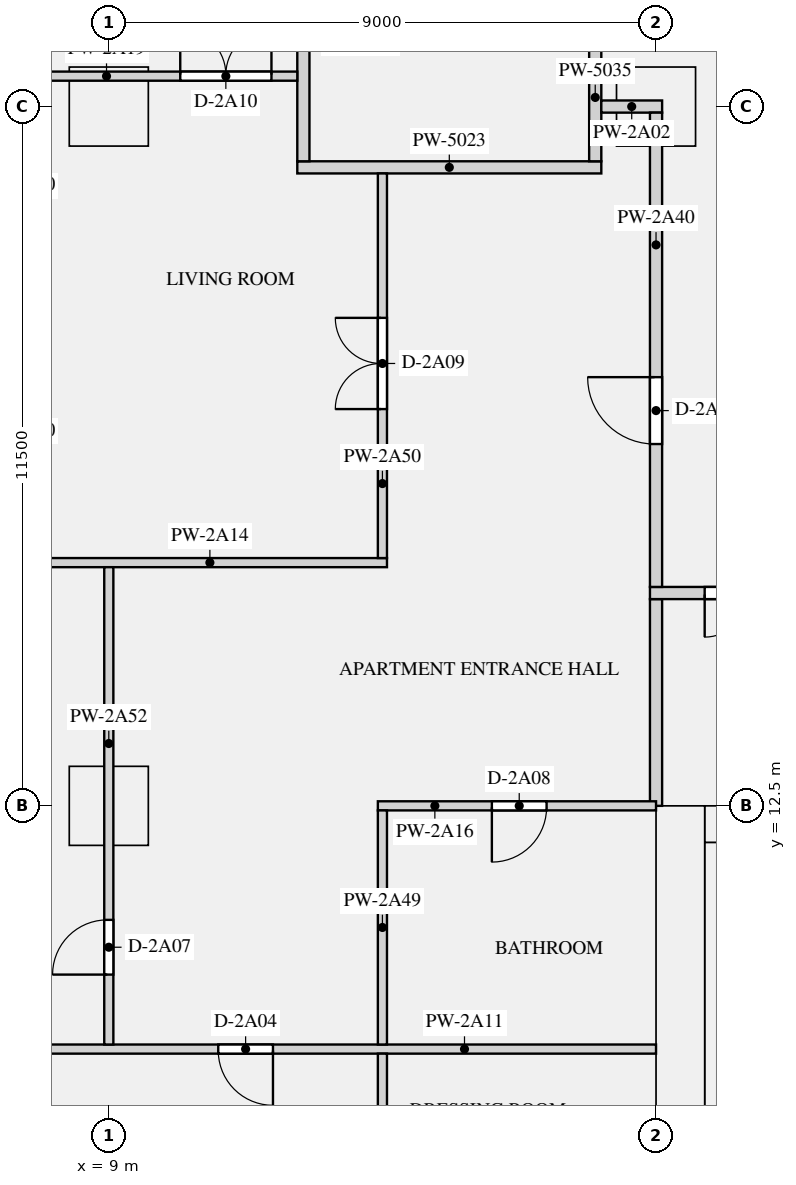
"""IFC4 building model, lengths in metres.
Left out: names, types, materials, properties, quantities, classifications, styles, units other than length and angle.
Written with IfcOpenShell. Run it as: python <this file> out.ifc"""

import sys

from ifc_helpers import new_model, si_unit, direction, frame, frame_2d, origin, origin_2d, place, context, subcontext, project, spatial, rectangle, extrude, element, fill, save


model = new_model("IFC4")
c1 = context("Model", 3, precision=1e-05, world=origin(), true_north=direction((0.0, 1.0)))
c2 = subcontext(c1, "Body", "Model", "MODEL_VIEW")
j1 = project(units=[si_unit("LENGTHUNIT", "METRE"), si_unit("PLANEANGLEUNIT", "RADIAN")], contexts=[c1])
p1 = place(None, origin())
s1 = spatial("IfcSite", under=j1, at=p1, CompositionType="ELEMENT")
p2 = place(p1, origin())
s2 = spatial("IfcBuilding", under=s1, at=p2, CompositionType="ELEMENT")
p3 = place(p2, frame((0.0, 0.0, 83.55)))
s3 = spatial("IfcBuildingStorey", under=s2, at=p3, CompositionType="ELEMENT", Elevation=83.55)
for number, where, z_axis, x_axis in (
    (1, (9.0, 24.0, 0.0), (0.0, 0.0, 1.0), (1.0, 0.0, 0.0)),
    (2, (18.0, 24.0, 0.0), (0.0, 0.0, 1.0), (1.0, 0.0, 0.0)),
    (3, (9.0, 12.5, 0.0), (0.0, 0.0, 1.0), (1.0, 0.0, 0.0)),
):
    element("IfcColumn", number, at=place(p3, frame(where, z_axis=z_axis, x_axis=x_axis)), inside=s3, PredefinedType="COLUMN", context=c2, shape_type="SweptSolid", body=[
        extrude(rectangle(XDim=1.3, YDim=1.3, at=origin_2d()), origin(), (0.0, 0.0, 1.0), 3.15),
    ])
p4 = place(p3, frame((18.4, 0.0, 0.0), z_axis=(0.0, 0.0, 1.0), x_axis=(0.0, 1.0, 0.0)))
e4 = element("IfcWall", 4, at=p4, inside=s3, PredefinedType="SHEAR", context=c2, shape_type="SweptSolid", body=[
    extrude(rectangle(XDim=12.5, YDim=0.8, at=frame_2d((6.25, 0.0))), origin(), (0.0, 0.0, 1.0), 3.15),
])
p5 = place(p3, frame((18.8, 12.2, 0.0), z_axis=(0.0, 0.0, 1.0), x_axis=(1.0, 0.0, 0.0)))
e5 = element("IfcWall", 5, at=p5, inside=s3, PredefinedType="SHEAR", context=c2, shape_type="SweptSolid", body=[
    extrude(rectangle(XDim=34.4, YDim=0.6, at=frame_2d((17.2, 0.0))), origin(), (0.0, 0.0, 1.0), 3.15),
])
p6 = place(p5, frame((24.375, 0.0, 0.0)))
e6 = element("IfcOpeningElement", 6, at=p6, cuts=e5, PredefinedType="OPENING", context=c2, shape_type="SweptSolid", body=[
    extrude(rectangle(XDim=1.1, YDim=2.1, at=frame_2d((0.55, 1.05))), frame((0.0, 0.31, 0.0), z_axis=(0.0, -1.0, 0.0), x_axis=(1.0, 0.0, 0.0)), (0.0, 0.0, 1.0), 0.62),
])
p7 = place(p5, frame((26.625, 0.0, 0.0)))
e7 = element("IfcOpeningElement", 7, at=p7, cuts=e5, PredefinedType="OPENING", context=c2, shape_type="SweptSolid", body=[
    extrude(rectangle(XDim=1.1, YDim=2.1, at=frame_2d((0.55, 1.05))), frame((0.0, 0.31, 0.0), z_axis=(0.0, -1.0, 0.0), x_axis=(1.0, 0.0, 0.0)), (0.0, 0.0, 1.0), 0.62),
])
p8 = place(p5, frame((28.875, 0.0, 0.0)))
e8 = element("IfcOpeningElement", 8, at=p8, cuts=e5, PredefinedType="OPENING", context=c2, shape_type="SweptSolid", body=[
    extrude(rectangle(XDim=1.1, YDim=2.1, at=frame_2d((0.55, 1.05))), frame((0.0, 0.31, 0.0), z_axis=(0.0, -1.0, 0.0), x_axis=(1.0, 0.0, 0.0)), (0.0, 0.0, 1.0), 0.62),
])
p9 = place(p5, frame((14.25, 0.0, 0.0)))
e9 = element("IfcOpeningElement", 9, at=p9, cuts=e5, PredefinedType="OPENING", context=c2, shape_type="SweptSolid", body=[
    extrude(rectangle(XDim=0.9, YDim=2.1, at=frame_2d((0.45, 1.05))), frame((0.0, 0.31, 0.0), z_axis=(0.0, -1.0, 0.0), x_axis=(1.0, 0.0, 0.0)), (0.0, 0.0, 1.0), 0.62),
])
p10 = place(p5, frame((1.35, 0.0, 0.0)))
e10 = element("IfcOpeningElement", 10, at=p10, cuts=e5, PredefinedType="OPENING", context=c2, shape_type="SweptSolid", body=[
    extrude(rectangle(XDim=1.2, YDim=2.1, at=frame_2d((0.6, 1.05))), frame((0.0, 0.31, 0.0), z_axis=(0.0, -1.0, 0.0), x_axis=(1.0, 0.0, 0.0)), (0.0, 0.0, 1.0), 0.62),
])
p11 = place(p5, frame((31.85, 0.0, 0.0)))
e11 = element("IfcOpeningElement", 11, at=p11, cuts=e5, PredefinedType="OPENING", context=c2, shape_type="SweptSolid", body=[
    extrude(rectangle(XDim=1.2, YDim=2.1, at=frame_2d((0.6, 1.05))), frame((0.0, 0.31, 0.0), z_axis=(0.0, -1.0, 0.0), x_axis=(1.0, 0.0, 0.0)), (0.0, 0.0, 1.0), 0.62),
])
p12 = place(p3, frame((18.9, 1.0, 0.0), z_axis=(0.0, 0.0, 1.0), x_axis=(0.0, 1.0, 0.0)))
e12 = element("IfcWall", 12, at=p12, inside=s3, PredefinedType="SHEAR", context=c2, shape_type="SweptSolid", body=[
    extrude(rectangle(XDim=10.9, YDim=0.2, at=frame_2d((5.45, 0.0))), origin(), (0.0, 0.0, 1.0), 3.15),
])
p13 = place(p3, frame((12.1, 23.0, 0.0), z_axis=(0.0, 0.0, 1.0), x_axis=(1.0, 0.0, 0.0)))
e13 = element("IfcWall", 13, at=p13, inside=s3, PredefinedType="PARTITIONING", context=c2, shape_type="SweptSolid", body=[
    extrude(rectangle(XDim=5.0, YDim=0.2, at=frame_2d((2.5, 0.0))), origin(), (0.0, 0.0, 1.0), 2.83),
])
p14 = place(p3, frame((18.0, 12.5, 0.0), z_axis=(0.0, 0.0, 1.0), x_axis=(0.0, 1.0, 0.0)))
e14 = element("IfcWall", 14, at=p14, inside=s3, PredefinedType="PARTITIONING", context=c2, shape_type="SweptSolid", body=[
    extrude(rectangle(XDim=3.4, YDim=0.2, at=frame_2d((1.7, 0.0))), origin(), (0.0, 0.0, 1.0), 2.83),
])
p15 = place(p3, frame((12.2, 23.1, 0.0), z_axis=(0.0, 0.0, 1.0), x_axis=(0.0, 1.0, 0.0)))
e15 = element("IfcWall", 15, at=p15, inside=s3, PredefinedType="PARTITIONING", context=c2, shape_type="SweptSolid", body=[
    extrude(rectangle(XDim=3.9, YDim=0.2, at=frame_2d((1.95, 0.0))), origin(), (0.0, 0.0, 1.0), 2.83),
])
p16 = place(p3, frame((17.0, 23.1, 0.0), z_axis=(0.0, 0.0, 1.0), x_axis=(0.0, 1.0, 0.0)))
e16 = element("IfcWall", 16, at=p16, inside=s3, PredefinedType="PARTITIONING", context=c2, shape_type="SweptSolid", body=[
    extrude(rectangle(XDim=3.8, YDim=0.2, at=frame_2d((1.9, 0.0))), origin(), (0.0, 0.0, 1.0), 2.83),
])
p17 = place(p16, frame((2.1, 0.0, 0.0)))
e17 = element("IfcOpeningElement", 17, at=p17, cuts=e16, PredefinedType="OPENING", context=c2, shape_type="SweptSolid", body=[
    extrude(rectangle(XDim=1.2, YDim=2.1, at=frame_2d((0.6, 1.05))), frame((0.0, 0.11, 0.0), z_axis=(0.0, -1.0, 0.0), x_axis=(1.0, 0.0, 0.0)), (0.0, 0.0, 1.0), 0.22),
])
p18 = place(p3, frame((17.1, 24.0, 0.0), z_axis=(0.0, 0.0, 1.0), x_axis=(1.0, 0.0, 0.0)))
e18 = element("IfcWall", 18, at=p18, inside=s3, PredefinedType="PARTITIONING", context=c2, shape_type="SweptSolid", body=[
    extrude(rectangle(XDim=1.0, YDim=0.2, at=frame_2d((0.5, 0.0))), origin(), (0.0, 0.0, 1.0), 2.83),
])
p19 = place(p3, frame((5.25, 8.5, 0.0), z_axis=(0.0, 0.0, 1.0), x_axis=(1.0, 0.0, 0.0)))
e19 = element("IfcWall", 19, at=p19, inside=s3, PredefinedType="PARTITIONING", context=c2, shape_type="SweptSolid", body=[
    extrude(rectangle(XDim=12.75, YDim=0.15, at=frame_2d((6.375, 0.0))), origin(), (0.0, 0.0, 1.0), 2.83),
])
p20 = place(p19, frame((5.55, 0.0, 0.0)))
e20 = element("IfcOpeningElement", 20, at=p20, cuts=e19, PredefinedType="OPENING", context=c2, shape_type="SweptSolid", body=[
    extrude(rectangle(XDim=0.9, YDim=2.1, at=frame_2d((0.45, 1.05))), frame((0.0, 0.085, 0.0), z_axis=(0.0, -1.0, 0.0), x_axis=(1.0, 0.0, 0.0)), (0.0, 0.0, 1.0), 0.17),
])
p21 = place(p3, frame((7.75, 16.5, 0.0), z_axis=(0.0, 0.0, 1.0), x_axis=(1.0, 0.0, 0.0)))
e21 = element("IfcWall", 21, at=p21, inside=s3, PredefinedType="PARTITIONING", context=c2, shape_type="SweptSolid", body=[
    extrude(rectangle(XDim=5.825, YDim=0.15, at=frame_2d((2.913, 0.0))), origin(), (0.0, 0.0, 1.0), 2.83),
])
p22 = place(p3, frame((13.425, 12.5, 0.0), z_axis=(0.0, 0.0, 1.0), x_axis=(1.0, 0.0, 0.0)))
e22 = element("IfcWall", 22, at=p22, inside=s3, PredefinedType="PARTITIONING", context=c2, shape_type="SweptSolid", body=[
    extrude(rectangle(XDim=4.575, YDim=0.15, at=frame_2d((2.288, 0.0))), origin(), (0.0, 0.0, 1.0), 2.83),
])
p23 = place(p22, frame((1.875, 0.0, 0.0)))
e23 = element("IfcOpeningElement", 23, at=p23, cuts=e22, PredefinedType="OPENING", context=c2, shape_type="SweptSolid", body=[
    extrude(rectangle(XDim=0.9, YDim=2.1, at=frame_2d((0.45, 1.05))), frame((0.0, 0.085, 0.0), z_axis=(0.0, -1.0, 0.0), x_axis=(1.0, 0.0, 0.0)), (0.0, 0.0, 1.0), 0.17),
])
p24 = place(p3, frame((7.75, 24.5, 0.0), z_axis=(0.0, 0.0, 1.0), x_axis=(1.0, 0.0, 0.0)))
e24 = element("IfcWall", 24, at=p24, inside=s3, PredefinedType="PARTITIONING", context=c2, shape_type="SweptSolid", body=[
    extrude(rectangle(XDim=4.35, YDim=0.15, at=frame_2d((2.175, 0.0))), origin(), (0.0, 0.0, 1.0), 2.83),
])
p25 = place(p24, frame((2.425, 0.0, 0.0)))
e25 = element("IfcOpeningElement", 25, at=p25, cuts=e24, PredefinedType="OPENING", context=c2, shape_type="SweptSolid", body=[
    extrude(rectangle(XDim=1.5, YDim=2.1, at=frame_2d((0.75, 1.05))), frame((0.0, 0.085, 0.0), z_axis=(0.0, -1.0, 0.0), x_axis=(1.0, 0.0, 0.0)), (0.0, 0.0, 1.0), 0.17),
])
p26 = place(p3, frame((17.9, 16.0, 0.0), z_axis=(0.0, 0.0, 1.0), x_axis=(1.0, 0.0, 0.0)))
e26 = element("IfcWall", 26, at=p26, inside=s3, PredefinedType="PARTITIONING", context=c2, shape_type="SweptSolid", body=[
    extrude(rectangle(XDim=36.2, YDim=0.2, at=frame_2d((18.1, 0.0))), origin(), (0.0, 0.0, 1.0), 2.83),
])
p27 = place(p26, frame((0.9, 0.0, 0.0)))
e27 = element("IfcOpeningElement", 27, at=p27, cuts=e26, PredefinedType="OPENING", context=c2, shape_type="SweptSolid", body=[
    extrude(rectangle(XDim=1.4, YDim=2.1, at=frame_2d((0.7, 1.05))), frame((0.0, 0.11, 0.0), z_axis=(0.0, -1.0, 0.0), x_axis=(1.0, 0.0, 0.0)), (0.0, 0.0, 1.0), 0.22),
])
p28 = place(p26, frame((33.9, 0.0, 0.0)))
e28 = element("IfcOpeningElement", 28, at=p28, cuts=e26, PredefinedType="OPENING", context=c2, shape_type="SweptSolid", body=[
    extrude(rectangle(XDim=1.4, YDim=2.1, at=frame_2d((0.7, 1.05))), frame((0.0, 0.11, 0.0), z_axis=(0.0, -1.0, 0.0), x_axis=(1.0, 0.0, 0.0)), (0.0, 0.0, 1.0), 0.22),
])
p29 = place(p3, frame((18.0, 16.1, 0.0), z_axis=(0.0, 0.0, 1.0), x_axis=(0.0, 1.0, 0.0)))
e29 = element("IfcWall", 29, at=p29, inside=s3, PredefinedType="PARTITIONING", context=c2, shape_type="SweptSolid", body=[
    extrude(rectangle(XDim=7.8, YDim=0.2, at=frame_2d((3.9, 0.0))), origin(), (0.0, 0.0, 1.0), 2.83),
])
p30 = place(p29, frame((2.35, 0.0, 0.0)))
e30 = element("IfcOpeningElement", 30, at=p30, cuts=e29, PredefinedType="OPENING", context=c2, shape_type="SweptSolid", body=[
    extrude(rectangle(XDim=1.1, YDim=2.1, at=frame_2d((0.55, 1.05))), frame((0.0, 0.11, 0.0), z_axis=(0.0, -1.0, 0.0), x_axis=(1.0, 0.0, 0.0)), (0.0, 0.0, 1.0), 0.22),
])
p31 = place(p3, frame((13.5, 0.75, 0.0), z_axis=(0.0, 0.0, 1.0), x_axis=(0.0, 1.0, 0.0)))
e31 = element("IfcWall", 31, at=p31, inside=s3, PredefinedType="PARTITIONING", context=c2, shape_type="SweptSolid", body=[
    extrude(rectangle(XDim=7.675, YDim=0.15, at=frame_2d((3.837, 0.0))), origin(), (0.0, 0.0, 1.0), 2.83),
])
p32 = place(p31, frame((1.25, 0.0, 0.0)))
e32 = element("IfcOpeningElement", 32, at=p32, cuts=e31, PredefinedType="OPENING", context=c2, shape_type="SweptSolid", body=[
    extrude(rectangle(XDim=0.9, YDim=2.1, at=frame_2d((0.45, 1.05))), frame((0.0, 0.085, 0.0), z_axis=(0.0, -1.0, 0.0), x_axis=(1.0, 0.0, 0.0)), (0.0, 0.0, 1.0), 0.17),
])
p33 = place(p31, frame((5.2, 0.0, 0.0)))
e33 = element("IfcOpeningElement", 33, at=p33, cuts=e31, PredefinedType="OPENING", context=c2, shape_type="SweptSolid", body=[
    extrude(rectangle(XDim=0.9, YDim=2.1, at=frame_2d((0.45, 1.05))), frame((0.0, 0.085, 0.0), z_axis=(0.0, -1.0, 0.0), x_axis=(1.0, 0.0, 0.0)), (0.0, 0.0, 1.0), 0.17),
])
p34 = place(p3, frame((13.5, 8.575, 0.0), z_axis=(0.0, 0.0, 1.0), x_axis=(0.0, 1.0, 0.0)))
e34 = element("IfcWall", 34, at=p34, inside=s3, PredefinedType="PARTITIONING", context=c2, shape_type="SweptSolid", body=[
    extrude(rectangle(XDim=3.85, YDim=0.15, at=frame_2d((1.925, 0.0))), origin(), (0.0, 0.0, 1.0), 2.83),
])
p35 = place(p3, frame((13.5, 16.575, 0.0), z_axis=(0.0, 0.0, 1.0), x_axis=(0.0, 1.0, 0.0)))
e35 = element("IfcWall", 35, at=p35, inside=s3, PredefinedType="PARTITIONING", context=c2, shape_type="SweptSolid", body=[
    extrude(rectangle(XDim=6.325, YDim=0.15, at=frame_2d((3.163, 0.0))), origin(), (0.0, 0.0, 1.0), 2.83),
])
p36 = place(p35, frame((2.45, 0.0, 0.0)))
e36 = element("IfcOpeningElement", 36, at=p36, cuts=e35, PredefinedType="OPENING", context=c2, shape_type="SweptSolid", body=[
    extrude(rectangle(XDim=1.5, YDim=2.1, at=frame_2d((0.75, 1.05))), frame((0.0, 0.085, 0.0), z_axis=(0.0, -1.0, 0.0), x_axis=(1.0, 0.0, 0.0)), (0.0, 0.0, 1.0), 0.17),
])
p37 = place(p3, frame((9.0, 8.575, 0.0), z_axis=(0.0, 0.0, 1.0), x_axis=(0.0, 1.0, 0.0)))
e37 = element("IfcWall", 37, at=p37, inside=s3, PredefinedType="PARTITIONING", context=c2, shape_type="SweptSolid", body=[
    extrude(rectangle(XDim=7.85, YDim=0.15, at=frame_2d((3.925, 0.0))), origin(), (0.0, 0.0, 1.0), 2.83),
])
p38 = place(p37, frame((1.15, 0.0, 0.0)))
e38 = element("IfcOpeningElement", 38, at=p38, cuts=e37, PredefinedType="OPENING", context=c2, shape_type="SweptSolid", body=[
    extrude(rectangle(XDim=0.9, YDim=2.1, at=frame_2d((0.45, 1.05))), frame((0.0, 0.085, 0.0), z_axis=(0.0, -1.0, 0.0), x_axis=(1.0, 0.0, 0.0)), (0.0, 0.0, 1.0), 0.17),
])
p39 = place(p27, frame((1.4, 0.0, 0.0), z_axis=(0.0, 0.0, 1.0), x_axis=(-1.0, 0.0, 0.0)))
e39 = element("IfcDoor", 39, at=p39, inside=s3, OperationType="DOUBLE_DOOR_SINGLE_SWING", PredefinedType="DOOR", context=c2, shape_type="SweptSolid", body=[
    extrude(rectangle(XDim=1.4, YDim=2.1, at=frame_2d((0.7, 1.05))), frame((0.0, 0.025, 0.0), z_axis=(0.0, -1.0, 0.0), x_axis=(1.0, 0.0, 0.0)), (0.0, 0.0, 1.0), 0.05),
])
fill(e27, e39)
p40 = place(p30, origin())
e40 = element("IfcDoor", 40, at=p40, inside=s3, OperationType="SINGLE_SWING_RIGHT", PredefinedType="DOOR", context=c2, shape_type="SweptSolid", body=[
    extrude(rectangle(XDim=1.1, YDim=2.1, at=frame_2d((0.55, 1.05))), frame((0.0, 0.025, 0.0), z_axis=(0.0, -1.0, 0.0), x_axis=(1.0, 0.0, 0.0)), (0.0, 0.0, 1.0), 0.05),
])
fill(e30, e40)
p41 = place(p20, frame((0.9, 0.0, 0.0), z_axis=(0.0, 0.0, 1.0), x_axis=(-1.0, 0.0, 0.0)))
e41 = element("IfcDoor", 41, at=p41, inside=s3, OperationType="SINGLE_SWING_LEFT", PredefinedType="DOOR", context=c2, shape_type="SweptSolid", body=[
    extrude(rectangle(XDim=0.9, YDim=2.1, at=frame_2d((0.45, 1.05))), frame((0.0, 0.025, 0.0), z_axis=(0.0, -1.0, 0.0), x_axis=(1.0, 0.0, 0.0)), (0.0, 0.0, 1.0), 0.05),
])
fill(e20, e41)
p42 = place(p38, origin())
e42 = element("IfcDoor", 42, at=p42, inside=s3, OperationType="SINGLE_SWING_LEFT", PredefinedType="DOOR", context=c2, shape_type="SweptSolid", body=[
    extrude(rectangle(XDim=0.9, YDim=2.1, at=frame_2d((0.45, 1.05))), frame((0.0, 0.025, 0.0), z_axis=(0.0, -1.0, 0.0), x_axis=(1.0, 0.0, 0.0)), (0.0, 0.0, 1.0), 0.05),
])
fill(e38, e42)
p43 = place(p23, frame((0.9, 0.0, 0.0), z_axis=(0.0, 0.0, 1.0), x_axis=(-1.0, 0.0, 0.0)))
e43 = element("IfcDoor", 43, at=p43, inside=s3, OperationType="SINGLE_SWING_RIGHT", PredefinedType="DOOR", context=c2, shape_type="SweptSolid", body=[
    extrude(rectangle(XDim=0.9, YDim=2.1, at=frame_2d((0.45, 1.05))), frame((0.0, 0.025, 0.0), z_axis=(0.0, -1.0, 0.0), x_axis=(1.0, 0.0, 0.0)), (0.0, 0.0, 1.0), 0.05),
])
fill(e23, e43)
p44 = place(p36, origin())
e44 = element("IfcDoor", 44, at=p44, inside=s3, OperationType="DOUBLE_DOOR_SINGLE_SWING", PredefinedType="DOOR", context=c2, shape_type="SweptSolid", body=[
    extrude(rectangle(XDim=1.5, YDim=2.1, at=frame_2d((0.75, 1.05))), frame((0.0, 0.025, 0.0), z_axis=(0.0, -1.0, 0.0), x_axis=(1.0, 0.0, 0.0)), (0.0, 0.0, 1.0), 0.05),
])
fill(e36, e44)
p45 = place(p25, origin())
e45 = element("IfcDoor", 45, at=p45, inside=s3, OperationType="DOUBLE_DOOR_SINGLE_SWING", PredefinedType="DOOR", context=c2, shape_type="SweptSolid", body=[
    extrude(rectangle(XDim=1.5, YDim=2.1, at=frame_2d((0.75, 1.05))), frame((0.0, 0.025, 0.0), z_axis=(0.0, -1.0, 0.0), x_axis=(1.0, 0.0, 0.0)), (0.0, 0.0, 1.0), 0.05),
])
fill(e25, e45)
save(model, sys.argv[1])
